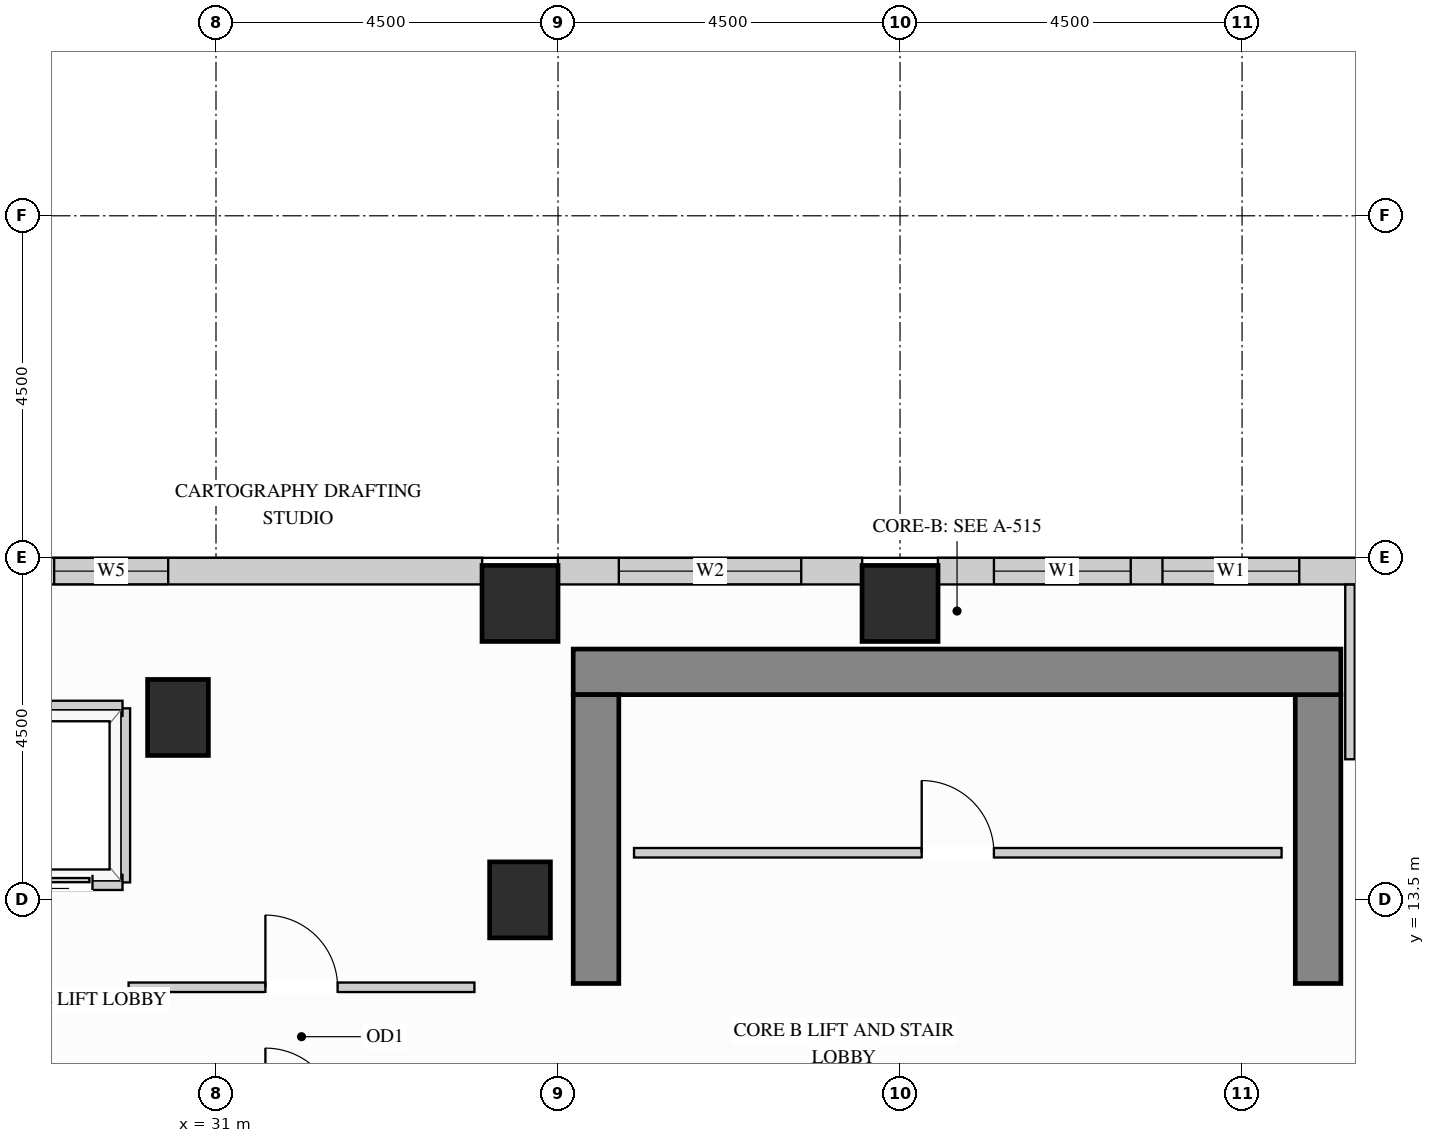
"""IFC4 building model, lengths in metres.
Left out: names, types, materials, properties, quantities, classifications, styles, units other than length and angle.
Written with IfcOpenShell. Run it as: python <this file> out.ifc"""

import sys

from ifc_helpers import new_model, si_unit, direction, frame, frame_2d, origin, origin_2d, place, context, subcontext, project, spatial, rectangle, extrude, source, transform, mapped, element, fill, save


model = new_model("IFC4")
c1 = context("Model", 3, precision=1e-05, world=origin(), true_north=direction((0.0, 1.0)))
c2 = subcontext(c1, "Body", "Model", "MODEL_VIEW")
j1 = project(units=[si_unit("LENGTHUNIT", "METRE"), si_unit("PLANEANGLEUNIT", "RADIAN")], contexts=[c1])
p1 = place(None, origin())
s1 = spatial("IfcSite", under=j1, at=p1, CompositionType="ELEMENT")
p2 = place(p1, origin())
s2 = spatial("IfcBuilding", under=s1, at=p2, CompositionType="ELEMENT")
p3 = place(p2, frame((0.0, 0.0, 200.7)))
s3 = spatial("IfcBuildingStorey", under=s2, at=p3, CompositionType="ELEMENT", Elevation=200.7)
m1 = source(origin(), c2, "Body", "SweptSolid", [
    extrude(rectangle(XDim=0.8, YDim=1.0, at=origin_2d()), origin(), (0.0, 0.0, 1.0), 3.4),
])
for number, where, z_axis, x_axis in (
    (1, (35.0, 13.5, 0.0), (0.0, 0.0, 1.0), (1.0, 0.0, 0.0)),
    (2, (30.5, 15.9, 0.0), (0.0, 0.0, 1.0), (1.0, 0.0, 0.0)),
):
    element("IfcColumn", number, at=place(p3, frame(where, z_axis=z_axis, x_axis=x_axis)), inside=s3, PredefinedType="COLUMN", context=c2, shape_type="MappedRepresentation", body=[
        mapped(m1, transform((0.0, 0.0, 0.0), x_axis=(1.0, 0.0, 0.0), y_axis=(0.0, 1.0, 0.0), z_axis=(0.0, 0.0, 1.0))),
    ])
m2 = source(origin(), c2, "Body", "SweptSolid", [
    extrude(rectangle(XDim=1.0, YDim=1.0, at=origin_2d()), origin(), (0.0, 0.0, 1.0), 3.4),
])
for number, where, z_axis, x_axis in (
    (3, (35.0, 17.4, 0.0), (0.0, 0.0, 1.0), (1.0, 0.0, 0.0)),
    (4, (40.0, 17.4, 0.0), (0.0, 0.0, 1.0), (1.0, 0.0, 0.0)),
):
    element("IfcColumn", number, at=place(p3, frame(where, z_axis=z_axis, x_axis=x_axis)), inside=s3, PredefinedType="COLUMN", context=c2, shape_type="MappedRepresentation", body=[
        mapped(m2, transform((0.0, 0.0, 0.0), x_axis=(1.0, 0.0, 0.0), y_axis=(0.0, 1.0, 0.0), z_axis=(0.0, 0.0, 1.0))),
    ])
m3 = source(origin(), c2, "Body", "SweptSolid", [
    extrude(rectangle(XDim=3.8, YDim=0.6, at=frame_2d((1.9, 0.0))), origin(), (0.0, 0.0, 1.0), 3.4),
])
p4 = place(p3, frame((45.5, 12.4, 0.0), z_axis=(0.0, 0.0, 1.0), x_axis=(0.0, 1.0, 0.0)))
e5 = element("IfcWall", 5, at=p4, inside=s3, PredefinedType="SHEAR", context=c2, shape_type="MappedRepresentation", body=[
    mapped(m3, transform((0.0, 0.0, 0.0), x_axis=(1.0, 0.0, 0.0), y_axis=(0.0, 1.0, 0.0), z_axis=(0.0, 0.0, 1.0))),
])
m4 = source(origin(), c2, "Body", "SweptSolid", [
    extrude(rectangle(XDim=10.1, YDim=0.6, at=frame_2d((5.05, 0.0))), origin(), (0.0, 0.0, 1.0), 3.4),
])
p5 = place(p3, frame((35.7, 16.5, 0.0), z_axis=(0.0, 0.0, 1.0), x_axis=(1.0, 0.0, 0.0)))
e6 = element("IfcWall", 6, at=p5, inside=s3, PredefinedType="SHEAR", context=c2, shape_type="MappedRepresentation", body=[
    mapped(m4, transform((0.0, 0.0, 0.0), x_axis=(1.0, 0.0, 0.0), y_axis=(0.0, 1.0, 0.0), z_axis=(0.0, 0.0, 1.0))),
])
p6 = place(p3, frame((36.0, 12.4, 0.0), z_axis=(0.0, 0.0, 1.0), x_axis=(0.0, 1.0, 0.0)))
e7 = element("IfcWall", 7, at=p6, inside=s3, PredefinedType="SHEAR", context=c2, shape_type="MappedRepresentation", body=[
    mapped(m3, transform((0.0, 0.0, 0.0), x_axis=(1.0, 0.0, 0.0), y_axis=(0.0, 1.0, 0.0), z_axis=(0.0, 0.0, 1.0))),
])
p7 = place(p3, frame((47.102, 17.825, 0.0), z_axis=(0.0, 0.0, 1.0), x_axis=(-1.0, 0.0, 0.0)))
e8 = element("IfcWall", 8, at=p7, inside=s3, PredefinedType="SOLIDWALL", context=c2, shape_type="SweptSolid", body=[
    extrude(rectangle(XDim=6.604, YDim=0.35, at=frame_2d((3.302, 0.0))), origin(), (0.0, 0.0, 1.0), 2.612),
])
p8 = place(p7, frame((1.849, 0.0, 0.78)))
e9 = element("IfcOpeningElement", 9, at=p8, cuts=e8, PredefinedType="OPENING", context=c2, shape_type="SweptSolid", body=[
    extrude(rectangle(XDim=1.8, YDim=1.652, at=frame_2d((0.9, 0.826))), frame((0.0, 0.185, 0.0), z_axis=(0.0, -1.0, 0.0), x_axis=(1.0, 0.0, 0.0)), (0.0, 0.0, 1.0), 0.37),
])
p9 = place(p7, frame((4.067, 0.0, 0.78)))
e10 = element("IfcOpeningElement", 10, at=p9, cuts=e8, PredefinedType="OPENING", context=c2, shape_type="SweptSolid", body=[
    extrude(rectangle(XDim=1.8, YDim=1.652, at=frame_2d((0.9, 0.826))), frame((0.0, 0.185, 0.0), z_axis=(0.0, -1.0, 0.0), x_axis=(1.0, 0.0, 0.0)), (0.0, 0.0, 1.0), 0.37),
])
p10 = place(p3, frame((39.502, 17.825, 0.0), z_axis=(0.0, 0.0, 1.0), x_axis=(-1.0, 0.0, 0.0)))
e11 = element("IfcWall", 11, at=p10, inside=s3, PredefinedType="SOLIDWALL", context=c2, shape_type="SweptSolid", body=[
    extrude(rectangle(XDim=4.004, YDim=0.35, at=frame_2d((2.002, 0.0))), origin(), (0.0, 0.0, 1.0), 2.612),
])
p11 = place(p10, frame((0.802, 0.0, 0.78)))
e12 = element("IfcOpeningElement", 12, at=p11, cuts=e11, PredefinedType="OPENING", context=c2, shape_type="SweptSolid", body=[
    extrude(rectangle(XDim=2.4, YDim=1.652, at=frame_2d((1.2, 0.826))), frame((0.0, 0.185, 0.0), z_axis=(0.0, -1.0, 0.0), x_axis=(1.0, 0.0, 0.0)), (0.0, 0.0, 1.0), 0.37),
])
p12 = place(p3, frame((34.502, 17.825, 0.0), z_axis=(0.0, 0.0, 1.0), x_axis=(-1.0, 0.0, 0.0)))
e13 = element("IfcWall", 13, at=p12, inside=s3, PredefinedType="SOLIDWALL", context=c2, shape_type="SweptSolid", body=[
    extrude(rectangle(XDim=15.104, YDim=0.35, at=frame_2d((7.552, 0.0))), origin(), (0.0, 0.0, 1.0), 3.385),
])
p13 = place(p12, frame((4.131, 0.0, 0.78)))
e14 = element("IfcOpeningElement", 14, at=p13, cuts=e13, PredefinedType="OPENING", context=c2, shape_type="SweptSolid", body=[
    extrude(rectangle(XDim=1.5, YDim=2.0, at=frame_2d((0.75, 1.0))), frame((0.0, 0.185, 0.0), z_axis=(0.0, -1.0, 0.0), x_axis=(1.0, 0.0, 0.0)), (0.0, 0.0, 1.0), 0.37),
])
p14 = place(p12, frame((9.442, 0.0, 0.78)))
e15 = element("IfcOpeningElement", 15, at=p14, cuts=e13, PredefinedType="OPENING", context=c2, shape_type="SweptSolid", body=[
    extrude(rectangle(XDim=1.5, YDim=2.0, at=frame_2d((0.75, 1.0))), frame((0.0, 0.185, 0.0), z_axis=(0.0, -1.0, 0.0), x_axis=(1.0, 0.0, 0.0)), (0.0, 0.0, 1.0), 0.37),
])
p15 = place(p3, frame((36.5, 14.12, 0.0), z_axis=(0.0, 0.0, 1.0), x_axis=(1.0, 0.0, 0.0)))
e16 = element("IfcWall", 16, at=p15, inside=s3, PredefinedType="PARTITIONING", context=c2, shape_type="SweptSolid", body=[
    extrude(rectangle(XDim=8.52, YDim=0.125, at=frame_2d((4.26, 0.0))), origin(), (0.0, 0.0, 1.0), 3.385),
])
p16 = place(p15, frame((3.785, 0.0, 0.0)))
e17 = element("IfcOpeningElement", 17, at=p16, cuts=e16, PredefinedType="OPENING", context=c2, shape_type="SweptSolid", body=[
    extrude(rectangle(XDim=0.95, YDim=2.15, at=frame_2d((0.475, 1.075))), frame((0.0, 0.073, 0.0), z_axis=(0.0, -1.0, 0.0), x_axis=(1.0, 0.0, 0.0)), (0.0, 0.0, 1.0), 0.145),
])
m5 = source(origin(), c2, "Body", "SweptSolid", [
    extrude(rectangle(XDim=2.298, YDim=0.125, at=frame_2d((1.149, 0.0))), origin(), (0.0, 0.0, 1.0), 3.385),
])
p17 = place(p3, frame((45.92, 15.35, 0.0), z_axis=(0.0, 0.0, 1.0), x_axis=(0.0, 1.0, 0.0)))
e18 = element("IfcWall", 18, at=p17, inside=s3, PredefinedType="PARTITIONING", context=c2, shape_type="MappedRepresentation", body=[
    mapped(m5, transform((0.0, 0.0, 0.0), x_axis=(1.0, 0.0, 0.0), y_axis=(0.0, 1.0, 0.0), z_axis=(0.0, 0.0, 1.0))),
])
p18 = place(p3, frame((29.85, 12.35, 0.0), z_axis=(0.0, 0.0, 1.0), x_axis=(1.0, 0.0, 0.0)))
e19 = element("IfcWall", 19, at=p18, inside=s3, PredefinedType="PARTITIONING", context=c2, shape_type="SweptSolid", body=[
    extrude(rectangle(XDim=4.55, YDim=0.125, at=frame_2d((2.275, 0.0))), origin(), (0.0, 0.0, 1.0), 3.385),
])
p19 = place(p18, frame((1.8, 0.0, 0.0)))
e20 = element("IfcOpeningElement", 20, at=p19, cuts=e19, PredefinedType="OPENING", context=c2, shape_type="SweptSolid", body=[
    extrude(rectangle(XDim=0.95, YDim=2.15, at=frame_2d((0.475, 1.075))), frame((0.0, 0.073, 0.0), z_axis=(0.0, -1.0, 0.0), x_axis=(1.0, 0.0, 0.0)), (0.0, 0.0, 1.0), 0.145),
])
m6 = source(origin(), c2, "Body", "SweptSolid", [
    extrude(rectangle(XDim=2.29, YDim=0.2, at=frame_2d((1.145, 0.0))), origin(), (0.0, 0.0, 1.0), 3.385),
])
p20 = place(p3, frame((29.77, 13.73, 0.0), z_axis=(0.0, 0.0, 1.0), x_axis=(0.0, 1.0, 0.0)))
e21 = element("IfcWall", 21, at=p20, inside=s3, PredefinedType="PARTITIONING", context=c2, shape_type="MappedRepresentation", body=[
    mapped(m6, transform((0.0, 0.0, 0.0), x_axis=(1.0, 0.0, 0.0), y_axis=(0.0, 1.0, 0.0), z_axis=(0.0, 0.0, 1.0))),
])
m7 = source(origin(), c2, "Body", "SweptSolid", [
    extrude(rectangle(XDim=1.89, YDim=0.2, at=frame_2d((0.945, 0.0))), origin(), (0.0, 0.0, 1.0), 2.773),
])
p21 = place(p3, frame((27.88, 16.02, 0.0), z_axis=(0.0, 0.0, 1.0), x_axis=(1.0, 0.0, 0.0)))
e22 = element("IfcWall", 22, at=p21, inside=s3, PredefinedType="PARTITIONING", context=c2, shape_type="MappedRepresentation", body=[
    mapped(m7, transform((0.0, 0.0, 0.0), x_axis=(1.0, 0.0, 0.0), y_axis=(0.0, 1.0, 0.0), z_axis=(0.0, 0.0, 1.0))),
])
p22 = place(p3, frame((27.88, 13.73, 0.0), z_axis=(0.0, 0.0, 1.0), x_axis=(1.0, 0.0, 0.0)))
e23 = element("IfcWall", 23, at=p22, inside=s3, PredefinedType="PARTITIONING", context=c2, shape_type="SweptSolid", body=[
    extrude(rectangle(XDim=1.89, YDim=0.2, at=frame_2d((0.945, 0.0))), origin(), (0.0, 0.0, 1.0), 2.466),
])
p23 = place(p22, frame((0.395, 0.0, 0.0)))
e24 = element("IfcOpeningElement", 24, at=p23, cuts=e23, PredefinedType="OPENING", context=c2, shape_type="SweptSolid", body=[
    extrude(rectangle(XDim=1.1, YDim=2.2, at=frame_2d((0.55, 1.1))), frame((0.0, 0.11, 0.0), z_axis=(0.0, -1.0, 0.0), x_axis=(1.0, 0.0, 0.0)), (0.0, 0.0, 1.0), 0.22),
])
m8 = source(origin(), c2, "Body", "SweptSolid", [
    extrude(rectangle(XDim=1.1, YDim=2.2, at=frame_2d((0.55, 1.1))), frame((0.0, 0.025, 0.0), z_axis=(0.0, -1.0, 0.0), x_axis=(1.0, 0.0, 0.0)), (0.0, 0.0, 1.0), 0.05),
])
p24 = place(p23, origin())
e25 = element("IfcDoor", 25, at=p24, inside=s3, OperationType="SLIDING_TO_LEFT", PredefinedType="DOOR", context=c2, shape_type="MappedRepresentation", body=[
    mapped(m8, transform((0.0, 0.0, 0.0), x_axis=(1.0, 0.0, 0.0), y_axis=(0.0, 1.0, 0.0), z_axis=(0.0, 0.0, 1.0))),
])
fill(e24, e25)
m9 = source(origin(), c2, "Body", "SweptSolid", [
    extrude(rectangle(XDim=0.95, YDim=2.15, at=frame_2d((0.475, 1.075))), frame((0.0, 0.025, 0.0), z_axis=(0.0, -1.0, 0.0), x_axis=(1.0, 0.0, 0.0)), (0.0, 0.0, 1.0), 0.05),
])
p25 = place(p16, origin())
e26 = element("IfcDoor", 26, at=p25, inside=s3, OperationType="SINGLE_SWING_LEFT", PredefinedType="DOOR", context=c2, shape_type="MappedRepresentation", body=[
    mapped(m9, transform((0.0, 0.0, 0.0), x_axis=(1.0, 0.0, 0.0), y_axis=(0.0, 1.0, 0.0), z_axis=(0.0, 0.0, 1.0))),
])
fill(e17, e26)
p26 = place(p19, origin())
e27 = element("IfcDoor", 27, at=p26, inside=s3, OperationType="SINGLE_SWING_LEFT", PredefinedType="DOOR", context=c2, shape_type="MappedRepresentation", body=[
    mapped(m9, transform((0.0, 0.0, 0.0), x_axis=(1.0, 0.0, 0.0), y_axis=(0.0, 1.0, 0.0), z_axis=(0.0, 0.0, 1.0))),
])
fill(e20, e27)
m10 = source(origin(), c2, "Body", "SweptSolid", [
    extrude(rectangle(XDim=1.8, YDim=1.652, at=frame_2d((0.9, 0.826))), frame((0.0, 0.03, 0.0), z_axis=(0.0, -1.0, 0.0), x_axis=(1.0, 0.0, 0.0)), (0.0, 0.0, 1.0), 0.06),
])
p27 = place(p8, origin())
e28 = element("IfcWindow", 28, at=p27, inside=s3, PartitioningType="SINGLE_PANEL", PredefinedType="WINDOW", context=c2, shape_type="MappedRepresentation", body=[
    mapped(m10, transform((0.0, 0.0, 0.0), x_axis=(1.0, 0.0, 0.0), y_axis=(0.0, 1.0, 0.0), z_axis=(0.0, 0.0, 1.0))),
])
fill(e9, e28)
p28 = place(p9, origin())
e29 = element("IfcWindow", 29, at=p28, inside=s3, PartitioningType="SINGLE_PANEL", PredefinedType="WINDOW", context=c2, shape_type="MappedRepresentation", body=[
    mapped(m10, transform((0.0, 0.0, 0.0), x_axis=(1.0, 0.0, 0.0), y_axis=(0.0, 1.0, 0.0), z_axis=(0.0, 0.0, 1.0))),
])
fill(e10, e29)
m11 = source(origin(), c2, "Body", "SweptSolid", [
    extrude(rectangle(XDim=2.4, YDim=1.652, at=frame_2d((1.2, 0.826))), frame((0.0, 0.03, 0.0), z_axis=(0.0, -1.0, 0.0), x_axis=(1.0, 0.0, 0.0)), (0.0, 0.0, 1.0), 0.06),
])
p29 = place(p11, origin())
e30 = element("IfcWindow", 30, at=p29, inside=s3, PartitioningType="SINGLE_PANEL", PredefinedType="WINDOW", context=c2, shape_type="MappedRepresentation", body=[
    mapped(m11, transform((0.0, 0.0, 0.0), x_axis=(1.0, 0.0, 0.0), y_axis=(0.0, 1.0, 0.0), z_axis=(0.0, 0.0, 1.0))),
])
fill(e12, e30)
m12 = source(origin(), c2, "Body", "SweptSolid", [
    extrude(rectangle(XDim=1.5, YDim=2.0, at=frame_2d((0.75, 1.0))), frame((0.0, 0.03, 0.0), z_axis=(0.0, -1.0, 0.0), x_axis=(1.0, 0.0, 0.0)), (0.0, 0.0, 1.0), 0.06),
])
p30 = place(p13, origin())
e31 = element("IfcWindow", 31, at=p30, inside=s3, PartitioningType="SINGLE_PANEL", PredefinedType="WINDOW", context=c2, shape_type="MappedRepresentation", body=[
    mapped(m12, transform((0.0, 0.0, 0.0), x_axis=(1.0, 0.0, 0.0), y_axis=(0.0, 1.0, 0.0), z_axis=(0.0, 0.0, 1.0))),
])
fill(e14, e31)
save(model, sys.argv[1])
